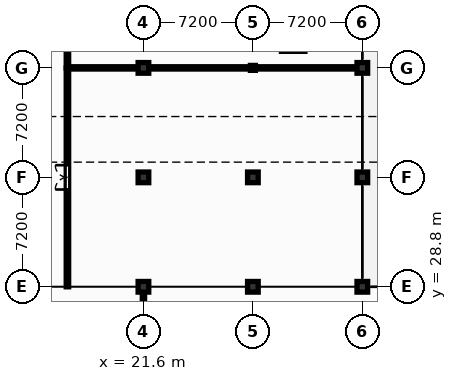
"""IFC4 building model, lengths in metres.
Left out: names, types, materials, properties, quantities, classifications, styles, units other than length and angle.
Written with IfcOpenShell. Run it as: python <this file> out.ifc"""

import sys

from ifc_helpers import new_model, si_unit, direction, frame, frame_2d, origin, origin_2d, place, context, subcontext, project, spatial, rectangle, hollow_circle, extrude, element, fill, save


model = new_model("IFC4")
c1 = context("Model", 3, precision=1e-05, world=origin(), true_north=direction((0.0, 1.0)))
c2 = subcontext(c1, "Body", "Model", "MODEL_VIEW")
j1 = project(units=[si_unit("LENGTHUNIT", "METRE"), si_unit("PLANEANGLEUNIT", "RADIAN")], contexts=[c1])
p1 = place(None, origin())
s1 = spatial("IfcSite", under=j1, at=p1, CompositionType="ELEMENT")
p2 = place(p1, origin())
s2 = spatial("IfcBuilding", under=s1, at=p2, CompositionType="ELEMENT")
p3 = place(p2, origin())
s3 = spatial("IfcBuildingStorey", under=s2, at=p3, CompositionType="ELEMENT", Elevation=0.0)
for number, where, z_axis, x_axis in (
    (1, (21.6, 28.8, 0.0), (0.0, 0.0, 1.0), (1.0, 0.0, 0.0)),
    (2, (21.6, 36.0, 0.0), (0.0, 0.0, 1.0), (1.0, 0.0, 0.0)),
    (3, (21.6, 43.2, 0.0), (0.0, 0.0, 1.0), (1.0, 0.0, 0.0)),
    (4, (28.8, 28.8, 0.0), (0.0, 0.0, 1.0), (1.0, 0.0, 0.0)),
    (5, (28.8, 36.0, 0.0), (0.0, 0.0, 1.0), (1.0, 0.0, 0.0)),
):
    element("IfcColumn", number, at=place(p3, frame(where, z_axis=z_axis, x_axis=x_axis)), inside=s3, PredefinedType="COLUMN", context=c2, shape_type="SweptSolid", body=[
        extrude(rectangle(XDim=0.7, YDim=0.7, at=origin_2d()), origin(), (0.0, 0.0, 1.0), 5.1),
    ])
p4 = place(p3, frame((28.8, 43.2, 0.0), z_axis=(0.0, 0.0, 1.0), x_axis=(1.0, 0.0, 0.0)))
e6 = element("IfcColumn", 6, at=p4, inside=s3, PredefinedType="COLUMN", context=c2, shape_type="SweptSolid", body=[
    extrude(hollow_circle(Radius=0.162, WallThickness=0.012, at=origin_2d()), origin(), (0.0, 0.0, 1.0), 5.1),
])
for number, where, z_axis, x_axis in (
    (7, (36.0, 28.8, 0.0), (0.0, 0.0, 1.0), (1.0, 0.0, 0.0)),
    (8, (36.0, 36.0, 0.0), (0.0, 0.0, 1.0), (1.0, 0.0, 0.0)),
    (9, (36.0, 43.2, 0.0), (0.0, 0.0, 1.0), (1.0, 0.0, 0.0)),
):
    element("IfcColumn", number, at=place(p3, frame(where, z_axis=z_axis, x_axis=x_axis)), inside=s3, PredefinedType="COLUMN", context=c2, shape_type="SweptSolid", body=[
        extrude(rectangle(XDim=0.7, YDim=0.7, at=origin_2d()), origin(), (0.0, 0.0, 1.0), 5.1),
    ])
p5 = place(p3, frame((16.6, 28.8, 0.0), z_axis=(0.0, 0.0, 1.0), x_axis=(0.0, 1.0, 0.0)))
e10 = element("IfcWall", 10, at=p5, inside=s3, PredefinedType="PARTITIONING", context=c2, shape_type="SweptSolid", body=[
    extrude(rectangle(XDim=14.4, YDim=0.16, at=frame_2d((7.2, 0.0))), origin(), (0.0, 0.0, 1.0), 4.348),
])
p6 = place(p5, frame((6.4, 0.0, 0.0)))
e11 = element("IfcOpeningElement", 11, at=p6, cuts=e10, PredefinedType="OPENING", context=c2, shape_type="SweptSolid", body=[
    extrude(rectangle(XDim=1.6, YDim=2.2, at=frame_2d((0.8, 1.1))), frame((0.0, 0.09, 0.0), z_axis=(0.0, -1.0, 0.0), x_axis=(1.0, 0.0, 0.0)), (0.0, 0.0, 1.0), 0.18),
])
p7 = place(p3, frame((16.6, 43.2, 0.0), z_axis=(0.0, 0.0, 1.0), x_axis=(0.0, 1.0, 0.0)))
e12 = element("IfcWall", 12, at=p7, inside=s3, PredefinedType="PARTITIONING", context=c2, shape_type="SweptSolid", body=[
    extrude(rectangle(XDim=15.6, YDim=0.16, at=frame_2d((7.8, 0.0))), origin(), (0.0, 0.0, 1.0), 4.8),
])
p8 = place(p7, frame((7.0, 0.0, 0.0)))
e13 = element("IfcOpeningElement", 13, at=p8, cuts=e12, PredefinedType="OPENING", context=c2, shape_type="SweptSolid", body=[
    extrude(rectangle(XDim=1.6, YDim=2.2, at=frame_2d((0.8, 1.1))), frame((0.0, 0.09, 0.0), z_axis=(0.0, -1.0, 0.0), x_axis=(1.0, 0.0, 0.0)), (0.0, 0.0, 1.0), 0.18),
])
p9 = place(p3, frame((16.6, 43.2, 0.0), z_axis=(0.0, 0.0, 1.0), x_axis=(1.0, 0.0, 0.0)))
e14 = element("IfcWall", 14, at=p9, inside=s3, PredefinedType="PARTITIONING", context=c2, shape_type="SweptSolid", body=[
    extrude(rectangle(XDim=19.4, YDim=0.15, at=frame_2d((9.7, 0.0))), origin(), (0.0, 0.0, 1.0), 4.333),
])
p10 = place(p3, frame((21.6, 14.4, 0.0), z_axis=(0.0, 0.0, 1.0), x_axis=(0.0, 1.0, 0.0)))
e15 = element("IfcWall", 15, at=p10, inside=s3, PredefinedType="PARTITIONING", context=c2, shape_type="SweptSolid", body=[
    extrude(rectangle(XDim=14.4, YDim=0.15, at=frame_2d((7.2, 0.0))), origin(), (0.0, 0.0, 1.0), 4.015),
])
p11 = place(p6, origin())
e16 = element("IfcDoor", 16, at=p11, inside=s3, OperationType="DOUBLE_DOOR_SINGLE_SWING", PredefinedType="DOOR", context=c2, shape_type="SweptSolid", body=[
    extrude(rectangle(XDim=1.6, YDim=2.2, at=frame_2d((0.8, 1.1))), frame((0.0, 0.025, 0.0), z_axis=(0.0, -1.0, 0.0), x_axis=(1.0, 0.0, 0.0)), (0.0, 0.0, 1.0), 0.05),
])
fill(e11, e16)
save(model, sys.argv[1])
